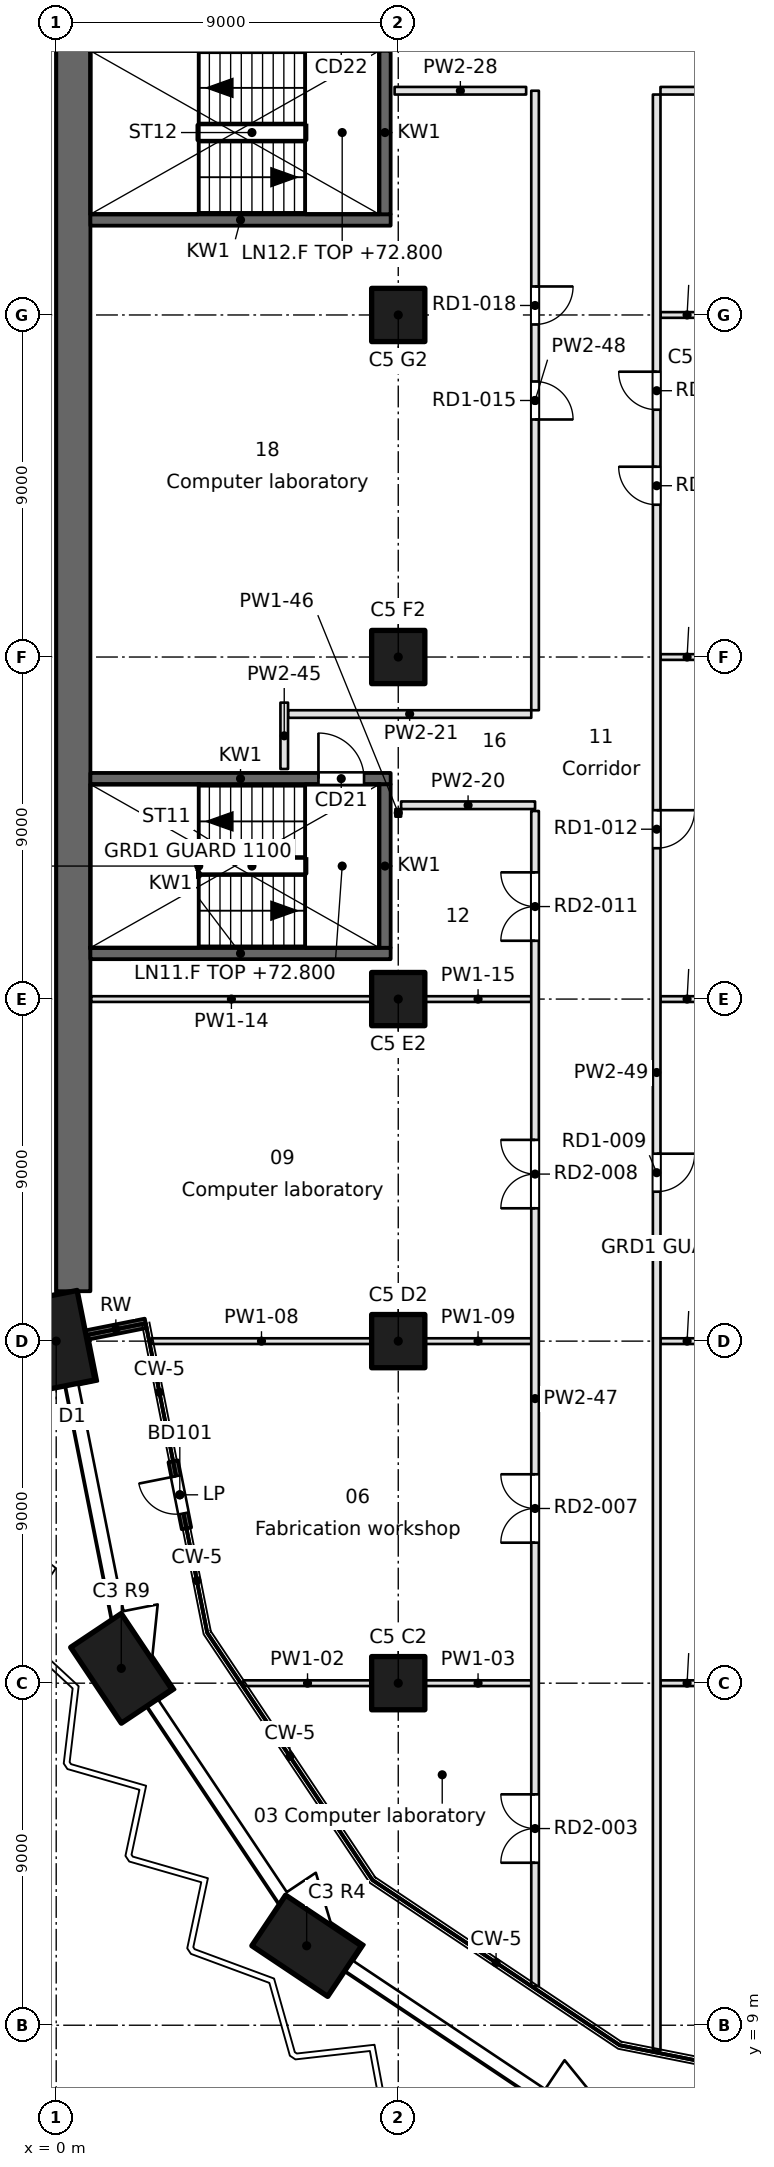
"""IFC4 building model, lengths in metres.
Left out: names, types, materials, properties, quantities, classifications, styles, units other than length and angle.
Written with IfcOpenShell. Run it as: python <this file> out.ifc"""

import sys

from ifc_helpers import new_model, si_unit, direction, frame, frame_2d, origin, origin_2d, place, context, subcontext, project, spatial, rectangle, extrude, element, fill, save


model = new_model("IFC4")
c1 = context("Model", 3, precision=1e-05, world=origin(), true_north=direction((0.0, 1.0)))
c2 = subcontext(c1, "Body", "Model", "MODEL_VIEW")
j1 = project(units=[si_unit("LENGTHUNIT", "METRE"), si_unit("PLANEANGLEUNIT", "RADIAN")], contexts=[c1])
p1 = place(None, origin())
s1 = spatial("IfcSite", under=j1, at=p1, CompositionType="ELEMENT")
p2 = place(p1, origin())
s2 = spatial("IfcBuilding", under=s1, at=p2, CompositionType="ELEMENT")
p3 = place(p2, frame((0.0, 0.0, 72.8)))
s3 = spatial("IfcBuildingStorey", under=s2, at=p3, CompositionType="ELEMENT", Elevation=72.8)
for number, where, z_axis, x_axis in (
    (1, (6.59, 11.09, 0.0), (0.0, 0.0, 1.0), (-0.831, 0.556, 0.0)),
    (2, (1.713, 18.39, 0.0), (0.0, 0.0, 1.0), (-0.556, 0.831, 0.0)),
    (3, (0.0, 27.0, 0.0), (0.0, 0.0, 1.0), (-0.195, 0.981, 0.0)),
):
    element("IfcColumn", number, at=place(p3, frame(where, z_axis=z_axis, x_axis=x_axis)), inside=s3, PredefinedType="COLUMN", context=c2, shape_type="SweptSolid", body=[
        extrude(rectangle(XDim=2.4, YDim=1.6, at=origin_2d()), origin(), (0.0, 0.0, 1.0), 3.7),
    ])
for number, where, z_axis, x_axis in (
    (4, (9.0, 18.0, 0.0), (0.0, 0.0, 1.0), (1.0, 0.0, 0.0)),
    (5, (9.0, 27.0, 0.0), (0.0, 0.0, 1.0), (1.0, 0.0, 0.0)),
    (6, (9.0, 36.0, 0.0), (0.0, 0.0, 1.0), (1.0, 0.0, 0.0)),
    (7, (9.0, 45.0, 0.0), (0.0, 0.0, 1.0), (1.0, 0.0, 0.0)),
    (8, (9.0, 54.0, 0.0), (0.0, 0.0, 1.0), (1.0, 0.0, 0.0)),
):
    element("IfcColumn", number, at=place(p3, frame(where, z_axis=z_axis, x_axis=x_axis)), inside=s3, PredefinedType="COLUMN", context=c2, shape_type="SweptSolid", body=[
        extrude(rectangle(XDim=1.4, YDim=1.4, at=origin_2d()), origin(), (0.0, 0.0, 1.0), 3.7),
    ])
p4 = place(p3, frame((0.45, 94.5, 0.0), z_axis=(0.0, 0.0, 1.0), x_axis=(0.0, -1.0, 0.0)))
e9 = element("IfcWall", 9, at=p4, inside=s3, PredefinedType="SHEAR", context=c2, shape_type="SweptSolid", body=[
    extrude(rectangle(XDim=66.187, YDim=0.9, at=frame_2d((33.094, 0.0))), origin(), (0.0, 0.0, 1.0), 3.7),
])
p5 = place(p3, frame((0.784, 27.157, 0.0), z_axis=(0.0, 0.0, 1.0), x_axis=(0.980826234823, 0.19488431718, 0.0)))
e10 = element("IfcWall", 10, at=p5, inside=s3, PredefinedType="SOLIDWALL", context=c2, shape_type="SweptSolid", body=[
    extrude(rectangle(XDim=1.601, YDim=0.25, at=frame_2d((0.801, 0.0))), origin(), (0.0, 0.0, 1.0), 3.3),
])
p6 = place(p3, frame((3.077, 23.839, 0.0), z_axis=(0.0, 0.0, 1.0), x_axis=(0.195046569833, -0.980793982239, 0.0)))
e11 = element("IfcWall", 11, at=p6, inside=s3, PredefinedType="SOLIDWALL", context=c2, shape_type="SweptSolid", body=[
    extrude(rectangle(XDim=1.8, YDim=0.25, at=frame_2d((0.9, 0.0))), origin(), (0.0, 0.0, 1.0), 3.3),
])
p7 = place(p6, frame((0.4, 0.0, 0.0)))
e12 = element("IfcOpeningElement", 12, at=p7, cuts=e11, PredefinedType="OPENING", context=c2, shape_type="SweptSolid", body=[
    extrude(rectangle(XDim=1.0, YDim=2.1, at=frame_2d((0.5, 1.05))), frame((0.0, 0.125, 0.0), z_axis=(0.0, -1.0, 0.0), x_axis=(1.0, 0.0, 0.0)), (0.0, 0.0, 1.0), 0.25),
])
p8 = place(p3, frame((0.9, 37.2, -0.4), z_axis=(0.0, 0.0, 1.0), x_axis=(1.0, 0.0, 0.0)))
e13 = element("IfcWall", 13, at=p8, inside=s3, PredefinedType="SOLIDWALL", context=c2, shape_type="SweptSolid", body=[
    extrude(rectangle(XDim=7.9, YDim=0.3, at=frame_2d((3.95, 0.0))), origin(), (0.0, 0.0, 1.0), 3.7),
])
p9 = place(p3, frame((0.9, 41.8, -0.4), z_axis=(0.0, 0.0, 1.0), x_axis=(1.0, 0.0, 0.0)))
e14 = element("IfcWall", 14, at=p9, inside=s3, PredefinedType="SOLIDWALL", context=c2, shape_type="SweptSolid", body=[
    extrude(rectangle(XDim=7.9, YDim=0.3, at=frame_2d((3.95, 0.0))), origin(), (0.0, 0.0, 1.0), 3.7),
])
p10 = place(p9, frame((6.0, 0.0, 0.4)))
e15 = element("IfcOpeningElement", 15, at=p10, cuts=e14, PredefinedType="OPENING", context=c2, shape_type="SweptSolid", body=[
    extrude(rectangle(XDim=1.2, YDim=2.1, at=frame_2d((0.6, 1.05))), frame((0.0, 0.15, 0.0), z_axis=(0.0, -1.0, 0.0), x_axis=(1.0, 0.0, 0.0)), (0.0, 0.0, 1.0), 0.3),
])
p11 = place(p3, frame((0.9, 56.5, -0.4), z_axis=(0.0, 0.0, 1.0), x_axis=(1.0, 0.0, 0.0)))
e16 = element("IfcWall", 16, at=p11, inside=s3, PredefinedType="SOLIDWALL", context=c2, shape_type="SweptSolid", body=[
    extrude(rectangle(XDim=7.9, YDim=0.3, at=frame_2d((3.95, 0.0))), origin(), (0.0, 0.0, 1.0), 3.7),
])
p12 = place(p3, frame((8.65, 37.35, -0.4), z_axis=(0.0, 0.0, 1.0), x_axis=(0.0, 1.0, 0.0)))
e17 = element("IfcWall", 17, at=p12, inside=s3, PredefinedType="SOLIDWALL", context=c2, shape_type="SweptSolid", body=[
    extrude(rectangle(XDim=4.3, YDim=0.3, at=frame_2d((2.15, 0.0))), origin(), (0.0, 0.0, 1.0), 3.7),
])
p13 = place(p3, frame((8.65, 56.65, -0.4), z_axis=(0.0, 0.0, 1.0), x_axis=(0.0, 1.0, 0.0)))
e18 = element("IfcWall", 18, at=p13, inside=s3, PredefinedType="SOLIDWALL", context=c2, shape_type="SweptSolid", body=[
    extrude(rectangle(XDim=4.3, YDim=0.3, at=frame_2d((2.15, 0.0))), origin(), (0.0, 0.0, 1.0), 3.7),
])
p14 = place(p3, frame((4.926, 18.0, 0.0), z_axis=(0.0, 0.0, 1.0), x_axis=(1.0, 0.0, 0.0)))
e19 = element("IfcWall", 19, at=p14, inside=s3, PredefinedType="PARTITIONING", context=c2, shape_type="SweptSolid", body=[
    extrude(rectangle(XDim=3.375, YDim=0.15, at=frame_2d((1.687, 0.0))), origin(), (0.0, 0.0, 1.0), 3.3),
])
p15 = place(p3, frame((9.7, 18.0, 0.0), z_axis=(0.0, 0.0, 1.0), x_axis=(1.0, 0.0, 0.0)))
e20 = element("IfcWall", 20, at=p15, inside=s3, PredefinedType="PARTITIONING", context=c2, shape_type="SweptSolid", body=[
    extrude(rectangle(XDim=2.8, YDim=0.15, at=frame_2d((1.4, 0.0))), origin(), (0.0, 0.0, 1.0), 3.3),
])
p16 = place(p3, frame((15.9, 18.0, 0.0), z_axis=(0.0, 0.0, 1.0), x_axis=(1.0, 0.0, 0.0)))
e21 = element("IfcWall", 21, at=p16, inside=s3, PredefinedType="PARTITIONING", context=c2, shape_type="SweptSolid", body=[
    extrude(rectangle(XDim=1.4, YDim=0.15, at=frame_2d((0.7, 0.0))), origin(), (0.0, 0.0, 1.0), 3.3),
])
p17 = place(p3, frame((2.503, 27.0, 0.0), z_axis=(0.0, 0.0, 1.0), x_axis=(1.0, 0.0, 0.0)))
e22 = element("IfcWall", 22, at=p17, inside=s3, PredefinedType="PARTITIONING", context=c2, shape_type="SweptSolid", body=[
    extrude(rectangle(XDim=5.797, YDim=0.15, at=frame_2d((2.898, 0.0))), origin(), (0.0, 0.0, 1.0), 3.3),
])
p18 = place(p3, frame((9.7, 27.0, 0.0), z_axis=(0.0, 0.0, 1.0), x_axis=(1.0, 0.0, 0.0)))
e23 = element("IfcWall", 23, at=p18, inside=s3, PredefinedType="PARTITIONING", context=c2, shape_type="SweptSolid", body=[
    extrude(rectangle(XDim=2.8, YDim=0.15, at=frame_2d((1.4, 0.0))), origin(), (0.0, 0.0, 1.0), 3.3),
])
p19 = place(p3, frame((15.9, 27.0, 0.0), z_axis=(0.0, 0.0, 1.0), x_axis=(1.0, 0.0, 0.0)))
e24 = element("IfcWall", 24, at=p19, inside=s3, PredefinedType="PARTITIONING", context=c2, shape_type="SweptSolid", body=[
    extrude(rectangle(XDim=1.4, YDim=0.15, at=frame_2d((0.7, 0.0))), origin(), (0.0, 0.0, 1.0), 3.3),
])
p20 = place(p3, frame((0.92, 36.0, 0.0), z_axis=(0.0, 0.0, 1.0), x_axis=(1.0, 0.0, 0.0)))
e25 = element("IfcWall", 25, at=p20, inside=s3, PredefinedType="PARTITIONING", context=c2, shape_type="SweptSolid", body=[
    extrude(rectangle(XDim=7.38, YDim=0.15, at=frame_2d((3.69, 0.0))), origin(), (0.0, 0.0, 1.0), 3.3),
])
p21 = place(p3, frame((9.7, 36.0, 0.0), z_axis=(0.0, 0.0, 1.0), x_axis=(1.0, 0.0, 0.0)))
e26 = element("IfcWall", 26, at=p21, inside=s3, PredefinedType="PARTITIONING", context=c2, shape_type="SweptSolid", body=[
    extrude(rectangle(XDim=2.8, YDim=0.15, at=frame_2d((1.4, 0.0))), origin(), (0.0, 0.0, 1.0), 3.3),
])
p22 = place(p3, frame((15.9, 36.0, 0.0), z_axis=(0.0, 0.0, 1.0), x_axis=(1.0, 0.0, 0.0)))
e27 = element("IfcWall", 27, at=p22, inside=s3, PredefinedType="PARTITIONING", context=c2, shape_type="SweptSolid", body=[
    extrude(rectangle(XDim=1.4, YDim=0.15, at=frame_2d((0.7, 0.0))), origin(), (0.0, 0.0, 1.0), 3.3),
])
p23 = place(p3, frame((12.6, 41.1, 0.0), z_axis=(0.0, 0.0, 1.0), x_axis=(-1.0, 0.0, 0.0)))
e28 = element("IfcWall", 28, at=p23, inside=s3, PredefinedType="PARTITIONING", context=c2, shape_type="SweptSolid", body=[
    extrude(rectangle(XDim=3.525, YDim=0.2, at=frame_2d((1.763, 0.0))), origin(), (0.0, 0.0, 1.0), 3.3),
])
p24 = place(p3, frame((6.1, 43.5, 0.0), z_axis=(0.0, 0.0, 1.0), x_axis=(1.0, 0.0, 0.0)))
e29 = element("IfcWall", 29, at=p24, inside=s3, PredefinedType="PARTITIONING", context=c2, shape_type="SweptSolid", body=[
    extrude(rectangle(XDim=6.4, YDim=0.2, at=frame_2d((3.2, 0.0))), origin(), (0.0, 0.0, 1.0), 3.3),
])
for number, where, z_axis, x_axis in (
    (30, (15.9, 45.0, 0.0), (0.0, 0.0, 1.0), (1.0, 0.0, 0.0)),
    (31, (15.9, 54.0, 0.0), (0.0, 0.0, 1.0), (1.0, 0.0, 0.0)),
):
    element("IfcWall", number, at=place(p3, frame(where, z_axis=z_axis, x_axis=x_axis)), inside=s3, PredefinedType="PARTITIONING", context=c2, shape_type="SweptSolid", body=[
        extrude(rectangle(XDim=1.4, YDim=0.15, at=frame_2d((0.7, 0.0))), origin(), (0.0, 0.0, 1.0), 3.3),
    ])
p25 = place(p3, frame((12.365, 59.9, 0.0), z_axis=(0.0, 0.0, 1.0), x_axis=(-1.0, 0.0, 0.0)))
e32 = element("IfcWall", 32, at=p25, inside=s3, PredefinedType="PARTITIONING", context=c2, shape_type="SweptSolid", body=[
    extrude(rectangle(XDim=3.461, YDim=0.2, at=frame_2d((1.73, 0.0))), origin(), (0.0, 0.0, 1.0), 3.3),
])
p26 = place(p3, frame((24.1, 59.9, 0.0), z_axis=(0.0, 0.0, 1.0), x_axis=(-1.0, 0.0, 0.0)))
e33 = element("IfcWall", 33, at=p26, inside=s3, PredefinedType="PARTITIONING", context=c2, shape_type="SweptSolid", body=[
    extrude(rectangle(XDim=8.2, YDim=0.2, at=frame_2d((4.1, 0.0))), origin(), (0.0, 0.0, 1.0), 3.3),
])
p27 = place(p26, frame((3.6, 0.0, 0.0)))
e34 = element("IfcOpeningElement", 34, at=p27, cuts=e33, PredefinedType="OPENING", context=c2, shape_type="SweptSolid", body=[
    extrude(rectangle(XDim=1.0, YDim=2.1, at=frame_2d((0.5, 1.05))), frame((0.0, 0.1, 0.0), z_axis=(0.0, -1.0, 0.0), x_axis=(1.0, 0.0, 0.0)), (0.0, 0.0, 1.0), 0.2),
])
p28 = place(p3, frame((6.0, 42.054, 0.0), z_axis=(0.0, 0.0, 1.0), x_axis=(0.0, 1.0, 0.0)))
e35 = element("IfcWall", 35, at=p28, inside=s3, PredefinedType="PARTITIONING", context=c2, shape_type="SweptSolid", body=[
    extrude(rectangle(XDim=1.746, YDim=0.2, at=frame_2d((0.873, 0.0))), origin(), (0.0, 0.0, 1.0), 3.3),
])
p29 = place(p3, frame((9.0, 41.0, 0.0), z_axis=(0.0, 0.0, 1.0), x_axis=(0.0, -1.0, 0.0)))
e36 = element("IfcWall", 36, at=p29, inside=s3, PredefinedType="PARTITIONING", context=c2, shape_type="SweptSolid", body=[
    extrude(rectangle(XDim=0.2, YDim=0.15, at=frame_2d((0.1, 0.0))), origin(), (0.0, 0.0, 1.0), 3.3),
])
p30 = place(p3, frame((12.6, 10.027, 0.0), z_axis=(0.0, 0.0, 1.0), x_axis=(0.0, 1.0, 0.0)))
e37 = element("IfcWall", 37, at=p30, inside=s3, PredefinedType="PARTITIONING", context=c2, shape_type="SweptSolid", body=[
    extrude(rectangle(XDim=30.921, YDim=0.2, at=frame_2d((15.46, 0.0))), origin(), (0.0, 0.0, 1.0), 3.3),
])
p31 = place(p30, frame((3.248, 0.0, 0.0)))
e38 = element("IfcOpeningElement", 38, at=p31, cuts=e37, PredefinedType="OPENING", context=c2, shape_type="SweptSolid", body=[
    extrude(rectangle(XDim=1.8, YDim=2.1, at=frame_2d((0.9, 1.05))), frame((0.0, 0.1, 0.0), z_axis=(0.0, -1.0, 0.0), x_axis=(1.0, 0.0, 0.0)), (0.0, 0.0, 1.0), 0.2),
])
p32 = place(p30, frame((11.67, 0.0, 0.0)))
e39 = element("IfcOpeningElement", 39, at=p32, cuts=e37, PredefinedType="OPENING", context=c2, shape_type="SweptSolid", body=[
    extrude(rectangle(XDim=1.8, YDim=2.1, at=frame_2d((0.9, 1.05))), frame((0.0, 0.1, 0.0), z_axis=(0.0, -1.0, 0.0), x_axis=(1.0, 0.0, 0.0)), (0.0, 0.0, 1.0), 0.2),
])
p33 = place(p30, frame((20.468, 0.0, 0.0)))
e40 = element("IfcOpeningElement", 40, at=p33, cuts=e37, PredefinedType="OPENING", context=c2, shape_type="SweptSolid", body=[
    extrude(rectangle(XDim=1.8, YDim=2.1, at=frame_2d((0.9, 1.05))), frame((0.0, 0.1, 0.0), z_axis=(0.0, -1.0, 0.0), x_axis=(1.0, 0.0, 0.0)), (0.0, 0.0, 1.0), 0.2),
])
p34 = place(p30, frame((27.507, 0.0, 0.0)))
e41 = element("IfcOpeningElement", 41, at=p34, cuts=e37, PredefinedType="OPENING", context=c2, shape_type="SweptSolid", body=[
    extrude(rectangle(XDim=1.8, YDim=2.1, at=frame_2d((0.9, 1.05))), frame((0.0, 0.1, 0.0), z_axis=(0.0, -1.0, 0.0), x_axis=(1.0, 0.0, 0.0)), (0.0, 0.0, 1.0), 0.2),
])
p35 = place(p3, frame((12.6, 43.6, 0.0), z_axis=(0.0, 0.0, 1.0), x_axis=(0.0, 1.0, 0.0)))
e42 = element("IfcWall", 42, at=p35, inside=s3, PredefinedType="PARTITIONING", context=c2, shape_type="SweptSolid", body=[
    extrude(rectangle(XDim=16.3, YDim=0.2, at=frame_2d((8.15, 0.0))), origin(), (0.0, 0.0, 1.0), 3.3),
])
p36 = place(p35, frame((7.65, 0.0, 0.0)))
e43 = element("IfcOpeningElement", 43, at=p36, cuts=e42, PredefinedType="OPENING", context=c2, shape_type="SweptSolid", body=[
    extrude(rectangle(XDim=1.0, YDim=2.1, at=frame_2d((0.5, 1.05))), frame((0.0, 0.1, 0.0), z_axis=(0.0, -1.0, 0.0), x_axis=(1.0, 0.0, 0.0)), (0.0, 0.0, 1.0), 0.2),
])
p37 = place(p35, frame((10.15, 0.0, 0.0)))
e44 = element("IfcOpeningElement", 44, at=p37, cuts=e42, PredefinedType="OPENING", context=c2, shape_type="SweptSolid", body=[
    extrude(rectangle(XDim=1.0, YDim=2.1, at=frame_2d((0.5, 1.05))), frame((0.0, 0.1, 0.0), z_axis=(0.0, -1.0, 0.0), x_axis=(1.0, 0.0, 0.0)), (0.0, 0.0, 1.0), 0.2),
])
p38 = place(p3, frame((15.8, 59.8, 0.0), z_axis=(0.0, 0.0, 1.0), x_axis=(0.0, -1.0, 0.0)))
e45 = element("IfcWall", 45, at=p38, inside=s3, PredefinedType="PARTITIONING", context=c2, shape_type="SweptSolid", body=[
    extrude(rectangle(XDim=51.464, YDim=0.2, at=frame_2d((25.732, 0.0))), origin(), (0.0, 0.0, 1.0), 3.3),
])
p39 = place(p38, frame((27.868, 0.0, 0.0)))
e46 = element("IfcOpeningElement", 46, at=p39, cuts=e45, PredefinedType="OPENING", context=c2, shape_type="SweptSolid", body=[
    extrude(rectangle(XDim=1.0, YDim=2.1, at=frame_2d((0.5, 1.05))), frame((0.0, 0.1, 0.0), z_axis=(0.0, -1.0, 0.0), x_axis=(1.0, 0.0, 0.0)), (0.0, 0.0, 1.0), 0.2),
])
p40 = place(p38, frame((18.831, 0.0, 0.0)))
e47 = element("IfcOpeningElement", 47, at=p40, cuts=e45, PredefinedType="OPENING", context=c2, shape_type="SweptSolid", body=[
    extrude(rectangle(XDim=1.0, YDim=2.1, at=frame_2d((0.5, 1.05))), frame((0.0, 0.1, 0.0), z_axis=(0.0, -1.0, 0.0), x_axis=(1.0, 0.0, 0.0)), (0.0, 0.0, 1.0), 0.2),
])
p41 = place(p38, frame((9.793, 0.0, 0.0)))
e48 = element("IfcOpeningElement", 48, at=p41, cuts=e45, PredefinedType="OPENING", context=c2, shape_type="SweptSolid", body=[
    extrude(rectangle(XDim=1.0, YDim=2.1, at=frame_2d((0.5, 1.05))), frame((0.0, 0.1, 0.0), z_axis=(0.0, -1.0, 0.0), x_axis=(1.0, 0.0, 0.0)), (0.0, 0.0, 1.0), 0.2),
])
p42 = place(p38, frame((7.293, 0.0, 0.0)))
e49 = element("IfcOpeningElement", 49, at=p42, cuts=e45, PredefinedType="OPENING", context=c2, shape_type="SweptSolid", body=[
    extrude(rectangle(XDim=1.0, YDim=2.1, at=frame_2d((0.5, 1.05))), frame((0.0, 0.1, 0.0), z_axis=(0.0, -1.0, 0.0), x_axis=(1.0, 0.0, 0.0)), (0.0, 0.0, 1.0), 0.2),
])
p43 = place(p7, frame((1.0, 0.0, 0.0), z_axis=(0.0, 0.0, 1.0), x_axis=(-1.0, 0.0, 0.0)))
e50 = element("IfcDoor", 50, at=p43, inside=s3, OperationType="SINGLE_SWING_RIGHT", PredefinedType="DOOR", context=c2, shape_type="SweptSolid", body=[
    extrude(rectangle(XDim=1.0, YDim=2.1, at=frame_2d((0.5, 1.05))), frame((0.0, 0.025, 0.0), z_axis=(0.0, -1.0, 0.0), x_axis=(1.0, 0.0, 0.0)), (0.0, 0.0, 1.0), 0.05),
])
fill(e12, e50)
p44 = place(p10, origin())
e51 = element("IfcDoor", 51, at=p44, inside=s3, OperationType="SINGLE_SWING_LEFT", PredefinedType="DOOR", context=c2, shape_type="SweptSolid", body=[
    extrude(rectangle(XDim=1.2, YDim=2.1, at=frame_2d((0.6, 1.05))), frame((0.0, 0.025, 0.0), z_axis=(0.0, -1.0, 0.0), x_axis=(1.0, 0.0, 0.0)), (0.0, 0.0, 1.0), 0.05),
])
fill(e15, e51)
p45 = place(p31, origin())
e52 = element("IfcDoor", 52, at=p45, inside=s3, OperationType="DOUBLE_DOOR_SINGLE_SWING", PredefinedType="DOOR", context=c2, shape_type="SweptSolid", body=[
    extrude(rectangle(XDim=1.8, YDim=2.1, at=frame_2d((0.9, 1.05))), frame((0.0, 0.025, 0.0), z_axis=(0.0, -1.0, 0.0), x_axis=(1.0, 0.0, 0.0)), (0.0, 0.0, 1.0), 0.05),
])
fill(e38, e52)
p46 = place(p32, origin())
e53 = element("IfcDoor", 53, at=p46, inside=s3, OperationType="DOUBLE_DOOR_SINGLE_SWING", PredefinedType="DOOR", context=c2, shape_type="SweptSolid", body=[
    extrude(rectangle(XDim=1.8, YDim=2.1, at=frame_2d((0.9, 1.05))), frame((0.0, 0.025, 0.0), z_axis=(0.0, -1.0, 0.0), x_axis=(1.0, 0.0, 0.0)), (0.0, 0.0, 1.0), 0.05),
])
fill(e39, e53)
p47 = place(p33, origin())
e54 = element("IfcDoor", 54, at=p47, inside=s3, OperationType="DOUBLE_DOOR_SINGLE_SWING", PredefinedType="DOOR", context=c2, shape_type="SweptSolid", body=[
    extrude(rectangle(XDim=1.8, YDim=2.1, at=frame_2d((0.9, 1.05))), frame((0.0, 0.025, 0.0), z_axis=(0.0, -1.0, 0.0), x_axis=(1.0, 0.0, 0.0)), (0.0, 0.0, 1.0), 0.05),
])
fill(e40, e54)
p48 = place(p39, origin())
e55 = element("IfcDoor", 55, at=p48, inside=s3, OperationType="SINGLE_SWING_LEFT", PredefinedType="DOOR", context=c2, shape_type="SweptSolid", body=[
    extrude(rectangle(XDim=1.0, YDim=2.1, at=frame_2d((0.5, 1.05))), frame((0.0, 0.025, 0.0), z_axis=(0.0, -1.0, 0.0), x_axis=(1.0, 0.0, 0.0)), (0.0, 0.0, 1.0), 0.05),
])
fill(e46, e55)
p49 = place(p34, origin())
e56 = element("IfcDoor", 56, at=p49, inside=s3, OperationType="DOUBLE_DOOR_SINGLE_SWING", PredefinedType="DOOR", context=c2, shape_type="SweptSolid", body=[
    extrude(rectangle(XDim=1.8, YDim=2.1, at=frame_2d((0.9, 1.05))), frame((0.0, 0.025, 0.0), z_axis=(0.0, -1.0, 0.0), x_axis=(1.0, 0.0, 0.0)), (0.0, 0.0, 1.0), 0.05),
])
fill(e41, e56)
p50 = place(p40, origin())
e57 = element("IfcDoor", 57, at=p50, inside=s3, OperationType="SINGLE_SWING_LEFT", PredefinedType="DOOR", context=c2, shape_type="SweptSolid", body=[
    extrude(rectangle(XDim=1.0, YDim=2.1, at=frame_2d((0.5, 1.05))), frame((0.0, 0.025, 0.0), z_axis=(0.0, -1.0, 0.0), x_axis=(1.0, 0.0, 0.0)), (0.0, 0.0, 1.0), 0.05),
])
fill(e47, e57)
p51 = place(p41, frame((1.0, 0.0, 0.0), z_axis=(0.0, 0.0, 1.0), x_axis=(-1.0, 0.0, 0.0)))
e58 = element("IfcDoor", 58, at=p51, inside=s3, OperationType="SINGLE_SWING_RIGHT", PredefinedType="DOOR", context=c2, shape_type="SweptSolid", body=[
    extrude(rectangle(XDim=1.0, YDim=2.1, at=frame_2d((0.5, 1.05))), frame((0.0, 0.025, 0.0), z_axis=(0.0, -1.0, 0.0), x_axis=(1.0, 0.0, 0.0)), (0.0, 0.0, 1.0), 0.05),
])
fill(e48, e58)
p52 = place(p36, frame((1.0, 0.0, 0.0), z_axis=(0.0, 0.0, 1.0), x_axis=(-1.0, 0.0, 0.0)))
e59 = element("IfcDoor", 59, at=p52, inside=s3, OperationType="SINGLE_SWING_RIGHT", PredefinedType="DOOR", context=c2, shape_type="SweptSolid", body=[
    extrude(rectangle(XDim=1.0, YDim=2.1, at=frame_2d((0.5, 1.05))), frame((0.0, 0.025, 0.0), z_axis=(0.0, -1.0, 0.0), x_axis=(1.0, 0.0, 0.0)), (0.0, 0.0, 1.0), 0.05),
])
fill(e43, e59)
p53 = place(p42, frame((1.0, 0.0, 0.0), z_axis=(0.0, 0.0, 1.0), x_axis=(-1.0, 0.0, 0.0)))
e60 = element("IfcDoor", 60, at=p53, inside=s3, OperationType="SINGLE_SWING_RIGHT", PredefinedType="DOOR", context=c2, shape_type="SweptSolid", body=[
    extrude(rectangle(XDim=1.0, YDim=2.1, at=frame_2d((0.5, 1.05))), frame((0.0, 0.025, 0.0), z_axis=(0.0, -1.0, 0.0), x_axis=(1.0, 0.0, 0.0)), (0.0, 0.0, 1.0), 0.05),
])
fill(e49, e60)
p54 = place(p37, frame((1.0, 0.0, 0.0), z_axis=(0.0, 0.0, 1.0), x_axis=(-1.0, 0.0, 0.0)))
e61 = element("IfcDoor", 61, at=p54, inside=s3, OperationType="SINGLE_SWING_LEFT", PredefinedType="DOOR", context=c2, shape_type="SweptSolid", body=[
    extrude(rectangle(XDim=1.0, YDim=2.1, at=frame_2d((0.5, 1.05))), frame((0.0, 0.025, 0.0), z_axis=(0.0, -1.0, 0.0), x_axis=(1.0, 0.0, 0.0)), (0.0, 0.0, 1.0), 0.05),
])
fill(e44, e61)
save(model, sys.argv[1])
